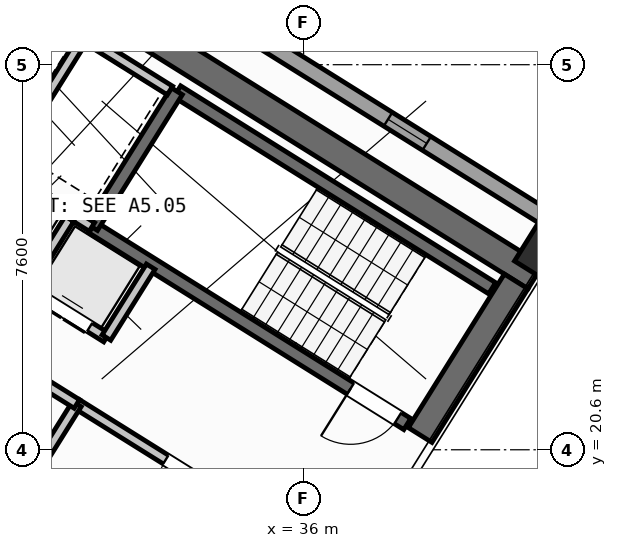
"""IFC4 building model, lengths in metres.
Left out: names, types, materials, properties, quantities, classifications, styles, units other than length and angle.
Written with IfcOpenShell. Run it as: python <this file> out.ifc"""

import sys

from ifc_helpers import new_model, si_unit, direction, frame, frame_2d, origin, origin_2d, place, context, subcontext, project, spatial, rectangle, hollow_rectangle, extrude, source, transform, mapped, element, fill, save


model = new_model("IFC4")
c1 = context("Model", 3, precision=1e-05, world=origin(), true_north=direction((0.0, 1.0)))
c2 = subcontext(c1, "Body", "Model", "MODEL_VIEW")
j1 = project(units=[si_unit("LENGTHUNIT", "METRE"), si_unit("PLANEANGLEUNIT", "RADIAN")], contexts=[c1])
p1 = place(None, origin())
s1 = spatial("IfcSite", under=j1, at=p1, CompositionType="ELEMENT")
p2 = place(p1, origin())
s2 = spatial("IfcBuilding", under=s1, at=p2, CompositionType="ELEMENT")
p3 = place(p2, frame((0.0, 0.0, 140.7)))
s3 = spatial("IfcBuildingStorey", under=s2, at=p3, CompositionType="ELEMENT", Elevation=140.7)
p4 = place(p3, frame((40.573, 24.01, 0.0), z_axis=(0.0, 0.0, 1.0), x_axis=(-0.848047359947, 0.529920442413, 0.0)))
e1 = element("IfcWall", 1, at=p4, inside=s3, PredefinedType="SHEAR", context=c2, shape_type="SweptSolid", body=[
    extrude(rectangle(XDim=13.14, YDim=0.55, at=frame_2d((6.57, 0.0))), origin(), (0.0, 0.0, 1.0), 3.35),
])
p5 = place(p3, frame((40.194, 23.922, 0.0), z_axis=(0.0, 0.0, 1.0), x_axis=(-0.529888438328, -0.848067357541, 0.0)))
e2 = element("IfcWall", 2, at=p5, inside=s3, PredefinedType="SHEAR", context=c2, shape_type="SweptSolid", body=[
    extrude(rectangle(XDim=3.575, YDim=0.55, at=frame_2d((1.788, 0.0))), origin(), (0.0, 0.0, 1.0), 3.35),
])
m1 = source(origin(), c2, "Body", "SweptSolid", [
    extrude(hollow_rectangle(XDim=0.9, YDim=0.9, WallThickness=0.036, at=origin_2d()), origin(), (0.0, 0.0, 1.0), 3.6),
])
p6 = place(p3, frame((40.783, 24.469, 0.0), z_axis=(0.0, 0.0, 1.0), x_axis=(-0.848048096156, 0.529919264233, 0.0)))
e3 = element("IfcColumn", 3, at=p6, inside=s3, PredefinedType="COLUMN", context=c2, shape_type="MappedRepresentation", body=[
    mapped(m1, transform((0.0, 0.0, 0.0), scale=1.0)),
])
p7 = place(p3, frame((14.138, 41.825, 0.0), z_axis=(0.0, 0.0, 1.0), x_axis=(0.848046498049, -0.529921821731, 0.0)))
e4 = element("IfcWall", 4, at=p7, inside=s3, PredefinedType="STANDARD", context=c2, shape_type="SweptSolid", body=[
    extrude(rectangle(XDim=31.588, YDim=0.32, at=frame_2d((15.794, 0.0))), origin(), (0.0, 0.0, 1.0), 3.35),
])
p8 = place(p7, frame((2.949, 0.0, 0.0)))
e5 = element("IfcOpeningElement", 5, at=p8, cuts=e4, PredefinedType="OPENING", context=c2, shape_type="SweptSolid", body=[
    extrude(rectangle(XDim=1.05, YDim=2.15, at=frame_2d((0.525, 1.075))), frame((0.0, 0.17, 0.0), z_axis=(0.0, -1.0, 0.0), x_axis=(1.0, 0.0, 0.0)), (0.0, 0.0, 1.0), 0.34),
])
p9 = place(p7, frame((0.861, 0.0, 0.85)))
e6 = element("IfcOpeningElement", 6, at=p9, cuts=e4, PredefinedType="OPENING", context=c2, shape_type="SweptSolid", body=[
    extrude(rectangle(XDim=1.5, YDim=1.5, at=frame_2d((0.75, 0.75))), frame((0.0, 0.17, 0.0), z_axis=(0.0, -1.0, 0.0), x_axis=(1.0, 0.0, 0.0)), (0.0, 0.0, 1.0), 0.34),
])
p10 = place(p7, frame((8.494, 0.0, 0.85)))
e7 = element("IfcOpeningElement", 7, at=p10, cuts=e4, PredefinedType="OPENING", context=c2, shape_type="SweptSolid", body=[
    extrude(rectangle(XDim=1.8, YDim=1.5, at=frame_2d((0.9, 0.75))), frame((0.0, 0.17, 0.0), z_axis=(0.0, -1.0, 0.0), x_axis=(1.0, 0.0, 0.0)), (0.0, 0.0, 1.0), 0.34),
])
p11 = place(p7, frame((13.874, 0.0, 0.85)))
e8 = element("IfcOpeningElement", 8, at=p11, cuts=e4, PredefinedType="OPENING", context=c2, shape_type="SweptSolid", body=[
    extrude(rectangle(XDim=1.5, YDim=1.5, at=frame_2d((0.75, 0.75))), frame((0.0, 0.17, 0.0), z_axis=(0.0, -1.0, 0.0), x_axis=(1.0, 0.0, 0.0)), (0.0, 0.0, 1.0), 0.34),
])
p12 = place(p7, frame((17.104, 0.0, 1.0)))
e9 = element("IfcOpeningElement", 9, at=p12, cuts=e4, PredefinedType="OPENING", context=c2, shape_type="SweptSolid", body=[
    extrude(rectangle(XDim=0.9, YDim=1.25, at=frame_2d((0.45, 0.625))), frame((0.0, 0.17, 0.0), z_axis=(0.0, -1.0, 0.0), x_axis=(1.0, 0.0, 0.0)), (0.0, 0.0, 1.0), 0.34),
])
p13 = place(p7, frame((22.144, 0.0, 1.0)))
e10 = element("IfcOpeningElement", 10, at=p13, cuts=e4, PredefinedType="OPENING", context=c2, shape_type="SweptSolid", body=[
    extrude(rectangle(XDim=0.9, YDim=1.25, at=frame_2d((0.45, 0.625))), frame((0.0, 0.17, 0.0), z_axis=(0.0, -1.0, 0.0), x_axis=(1.0, 0.0, 0.0)), (0.0, 0.0, 1.0), 0.34),
])
p14 = place(p7, frame((27.744, 0.0, 1.0)))
e11 = element("IfcOpeningElement", 11, at=p14, cuts=e4, PredefinedType="OPENING", context=c2, shape_type="SweptSolid", body=[
    extrude(rectangle(XDim=0.9, YDim=1.25, at=frame_2d((0.45, 0.625))), frame((0.0, 0.17, 0.0), z_axis=(0.0, -1.0, 0.0), x_axis=(1.0, 0.0, 0.0)), (0.0, 0.0, 1.0), 0.34),
])
p15 = place(p3, frame((31.28, 18.261, 0.0), z_axis=(0.0, 0.0, 1.0), x_axis=(-0.848051618787, 0.529913626805, 0.0)))
e12 = element("IfcWall", 12, at=p15, inside=s3, PredefinedType="SHEAR", context=c2, shape_type="SweptSolid", body=[
    extrude(rectangle(XDim=7.46, YDim=0.26, at=frame_2d((3.73, 0.0))), origin(), (0.0, 0.0, 1.0), 3.35),
])
p16 = place(p15, frame((0.36, 0.0, 0.0)))
e13 = element("IfcOpeningElement", 13, at=p16, cuts=e12, PredefinedType="OPENING", context=c2, shape_type="SweptSolid", body=[
    extrude(rectangle(XDim=0.86, YDim=2.05, at=frame_2d((0.43, 1.025))), frame((0.0, 0.14, 0.0), z_axis=(0.0, -1.0, 0.0), x_axis=(1.0, 0.0, 0.0)), (0.0, 0.0, 1.0), 0.28),
])
p17 = place(p3, frame((39.721, 23.788, 0.0), z_axis=(0.0, 0.0, 1.0), x_axis=(-0.848054434086, 0.529909121291, 0.0)))
e14 = element("IfcWall", 14, at=p17, inside=s3, PredefinedType="SHEAR", context=c2, shape_type="SweptSolid", body=[
    extrude(rectangle(XDim=7.33, YDim=0.26, at=frame_2d((3.665, 0.0))), origin(), (0.0, 0.0, 1.0), 3.35),
])
p18 = place(p3, frame((38.046, 21.108, 0.0), z_axis=(0.0, 0.0, 1.0), x_axis=(-0.848054434086, 0.529909121291, 0.0)))
e15 = element("IfcWall", 15, at=p18, inside=s3, PredefinedType="SHEAR", context=c2, shape_type="SweptSolid", body=[
    extrude(rectangle(XDim=7.33, YDim=0.26, at=frame_2d((3.665, 0.0))), origin(), (0.0, 0.0, 1.0), 3.35),
])
p19 = place(p18, frame((0.22, 0.0, 0.0)))
e16 = element("IfcOpeningElement", 16, at=p19, cuts=e15, PredefinedType="OPENING", context=c2, shape_type="SweptSolid", body=[
    extrude(rectangle(XDim=1.1, YDim=2.1, at=frame_2d((0.55, 1.05))), frame((0.0, 0.14, 0.0), z_axis=(0.0, -1.0, 0.0), x_axis=(1.0, 0.0, 0.0)), (0.0, 0.0, 1.0), 0.28),
])
p20 = place(p3, frame((33.496, 27.677, 0.0), z_axis=(0.0, 0.0, 1.0), x_axis=(-0.529908658664, -0.84805472316, 0.0)))
e17 = element("IfcWall", 17, at=p20, inside=s3, PredefinedType="SHEAR", context=c2, shape_type="SweptSolid", body=[
    extrude(rectangle(XDim=3.16, YDim=0.26, at=frame_2d((1.58, 0.0))), origin(), (0.0, 0.0, 1.0), 3.35),
])
p21 = place(p3, frame((36.417, 18.447, 0.0), z_axis=(0.0, 0.0, 1.0), x_axis=(-0.848064879198, 0.529892404805, 0.0)))
e18 = element("IfcWall", 18, at=p21, inside=s3, PredefinedType="STANDARD", context=c2, shape_type="SweptSolid", body=[
    extrude(rectangle(XDim=5.768, YDim=0.2, at=frame_2d((2.884, 0.0))), origin(), (0.0, 0.0, 1.0), 3.34),
])
p22 = place(p21, frame((2.548, 0.0, 0.0)))
e19 = element("IfcOpeningElement", 19, at=p22, cuts=e18, PredefinedType="OPENING", context=c2, shape_type="SweptSolid", body=[
    extrude(rectangle(XDim=1.15, YDim=2.1, at=frame_2d((0.575, 1.05))), frame((0.0, 0.11, 0.0), z_axis=(0.0, -1.0, 0.0), x_axis=(1.0, 0.0, 0.0)), (0.0, 0.0, 1.0), 0.22),
])
p23 = place(p3, frame((31.822, 24.998, 0.0), z_axis=(0.0, 0.0, 1.0), x_axis=(-0.848036912365, 0.52993716162, 0.0)))
e20 = element("IfcWall", 20, at=p23, inside=s3, PredefinedType="STANDARD", context=c2, shape_type="SweptSolid", body=[
    extrude(rectangle(XDim=4.618, YDim=0.2, at=frame_2d((2.309, 0.0))), origin(), (0.0, 0.0, 1.0), 3.34),
])
p24 = place(p3, frame((32.108, 22.814, 0.0), z_axis=(0.0, 0.0, 1.0), x_axis=(-0.848042229521, 0.529928652696, 0.0)))
e21 = element("IfcWall", 21, at=p24, inside=s3, PredefinedType="STANDARD", context=c2, shape_type="SweptSolid", body=[
    extrude(rectangle(XDim=5.62, YDim=0.2, at=frame_2d((2.81, 0.0))), origin(), (0.0, 0.0, 1.0), 3.34),
])
p25 = place(p24, frame((0.39, 0.0, 0.0)))
e22 = element("IfcOpeningElement", 22, at=p25, cuts=e21, PredefinedType="OPENING", context=c2, shape_type="SweptSolid", body=[
    extrude(rectangle(XDim=1.1, YDim=2.15, at=frame_2d((0.55, 1.075))), frame((0.0, 0.11, 0.0), z_axis=(0.0, -1.0, 0.0), x_axis=(1.0, 0.0, 0.0)), (0.0, 0.0, 1.0), 0.22),
])
p26 = place(p24, frame((2.25, 0.0, 0.0)))
e23 = element("IfcOpeningElement", 23, at=p26, cuts=e21, PredefinedType="OPENING", context=c2, shape_type="SweptSolid", body=[
    extrude(rectangle(XDim=1.1, YDim=2.15, at=frame_2d((0.55, 1.075))), frame((0.0, 0.11, 0.0), z_axis=(0.0, -1.0, 0.0), x_axis=(1.0, 0.0, 0.0)), (0.0, 0.0, 1.0), 0.22),
])
p27 = place(p24, frame((4.11, 0.0, 0.0)))
e24 = element("IfcOpeningElement", 24, at=p27, cuts=e21, PredefinedType="OPENING", context=c2, shape_type="SweptSolid", body=[
    extrude(rectangle(XDim=1.1, YDim=2.15, at=frame_2d((0.55, 1.075))), frame((0.0, 0.11, 0.0), z_axis=(0.0, -1.0, 0.0), x_axis=(1.0, 0.0, 0.0)), (0.0, 0.0, 1.0), 0.22),
])
p28 = place(p3, frame((32.982, 24.213, 0.0), z_axis=(0.0, 0.0, 1.0), x_axis=(-0.529839334948, -0.84809803628, 0.0)))
e25 = element("IfcWall", 25, at=p28, inside=s3, PredefinedType="STANDARD", context=c2, shape_type="SweptSolid", body=[
    extrude(rectangle(XDim=1.65, YDim=0.2, at=frame_2d((0.825, 0.0))), origin(), (0.0, 0.0, 1.0), 3.34),
])
p29 = place(p3, frame((31.645, 28.716, 0.0), z_axis=(0.0, 0.0, 1.0), x_axis=(-0.52986693015, -0.848080795876, 0.0)))
e26 = element("IfcWall", 26, at=p29, inside=s3, PredefinedType="STANDARD", context=c2, shape_type="SweptSolid", body=[
    extrude(rectangle(XDim=2.66, YDim=0.2, at=frame_2d((1.33, 0.0))), origin(), (0.0, 0.0, 1.0), 3.34),
])
p30 = place(p3, frame((33.363, 27.69, 0.0), z_axis=(0.0, 0.0, 1.0), x_axis=(-0.848047090064, 0.529920874315, 0.0)))
e27 = element("IfcWall", 27, at=p30, inside=s3, PredefinedType="STANDARD", context=c2, shape_type="SweptSolid", body=[
    extrude(rectangle(XDim=4.498, YDim=0.2, at=frame_2d((2.249, 0.0))), origin(), (0.0, 0.0, 1.0), 3.34),
])
p31 = place(p3, frame((31.379, 25.156, 0.0), z_axis=(0.0, 0.0, 1.0), x_axis=(-0.529998940003, -0.847998304005, 0.0)))
e28 = element("IfcWall", 28, at=p31, inside=s3, PredefinedType="STANDARD", context=c2, shape_type="SweptSolid", body=[
    extrude(rectangle(XDim=1.58, YDim=0.2, at=frame_2d((0.79, 0.0))), origin(), (0.0, 0.0, 1.0), 3.34),
])
p32 = place(p3, frame((31.525, 21.504, 0.0), z_axis=(0.0, 0.0, 1.0), x_axis=(-0.529907497854, -0.848055448493, 0.0)))
e29 = element("IfcWall", 29, at=p32, inside=s3, PredefinedType="STANDARD", context=c2, shape_type="SweptSolid", body=[
    extrude(rectangle(XDim=2.88, YDim=0.2, at=frame_2d((1.44, 0.0))), origin(), (0.0, 0.0, 1.0), 3.34),
])
p33 = place(p3, frame((31.525, 21.504, 0.0), z_axis=(0.0, 0.0, 1.0), x_axis=(-0.848040211232, 0.529931882541, 0.0)))
e30 = element("IfcWall", 30, at=p33, inside=s3, PredefinedType="STANDARD", context=c2, shape_type="SweptSolid", body=[
    extrude(rectangle(XDim=6.218, YDim=0.2, at=frame_2d((3.109, 0.0))), origin(), (0.0, 0.0, 1.0), 3.34),
])
p34 = place(p33, frame((4.4, 0.0, 0.0)))
e31 = element("IfcOpeningElement", 31, at=p34, cuts=e30, PredefinedType="OPENING", context=c2, shape_type="SweptSolid", body=[
    extrude(rectangle(XDim=0.86, YDim=2.05, at=frame_2d((0.43, 1.025))), frame((0.0, 0.11, 0.0), z_axis=(0.0, -1.0, 0.0), x_axis=(1.0, 0.0, 0.0)), (0.0, 0.0, 1.0), 0.22),
])
p35 = place(p33, frame((1.45, 0.0, 0.0)))
e32 = element("IfcOpeningElement", 32, at=p35, cuts=e30, PredefinedType="OPENING", context=c2, shape_type="SweptSolid", body=[
    extrude(rectangle(XDim=0.86, YDim=2.05, at=frame_2d((0.43, 1.025))), frame((0.0, 0.11, 0.0), z_axis=(0.0, -1.0, 0.0), x_axis=(1.0, 0.0, 0.0)), (0.0, 0.0, 1.0), 0.22),
])
m2 = source(origin(), c2, "Body", "SweptSolid", [
    extrude(rectangle(XDim=0.9, YDim=1.25, at=frame_2d((0.45, 0.625))), frame((0.0, 0.03, 0.0), z_axis=(0.0, -1.0, 0.0), x_axis=(1.0, 0.0, 0.0)), (0.0, 0.0, 1.0), 0.06),
])
p36 = place(p14, origin())
e33 = element("IfcWindow", 33, at=p36, inside=s3, PartitioningType="SINGLE_PANEL", PredefinedType="WINDOW", context=c2, shape_type="MappedRepresentation", body=[
    mapped(m2, transform((0.0, 0.0, 0.0), scale=1.0)),
])
fill(e11, e33)
m3 = source(origin(), c2, "Body", "SweptSolid", [
    extrude(rectangle(XDim=1.1, YDim=2.1, at=frame_2d((0.55, 1.05))), frame((0.0, 0.025, 0.0), z_axis=(0.0, -1.0, 0.0), x_axis=(1.0, 0.0, 0.0)), (0.0, 0.0, 1.0), 0.05),
])
p37 = place(p19, origin())
e34 = element("IfcDoor", 34, at=p37, inside=s3, OperationType="SINGLE_SWING_RIGHT", PredefinedType="DOOR", context=c2, shape_type="MappedRepresentation", body=[
    mapped(m3, transform((0.0, 0.0, 0.0), scale=1.0)),
])
fill(e16, e34)
m4 = source(origin(), c2, "Body", "SweptSolid", [
    extrude(rectangle(XDim=1.15, YDim=2.1, at=frame_2d((0.575, 1.05))), frame((0.0, 0.025, 0.0), z_axis=(0.0, -1.0, 0.0), x_axis=(1.0, 0.0, 0.0)), (0.0, 0.0, 1.0), 0.05),
])
p38 = place(p22, origin())
e35 = element("IfcDoor", 35, at=p38, inside=s3, OperationType="SINGLE_SWING_LEFT", PredefinedType="DOOR", context=c2, shape_type="MappedRepresentation", body=[
    mapped(m4, transform((0.0, 0.0, 0.0), scale=1.0)),
])
fill(e19, e35)
m5 = source(origin(), c2, "Body", "SweptSolid", [
    extrude(rectangle(XDim=1.1, YDim=2.15, at=frame_2d((0.55, 1.075))), frame((0.0, 0.025, 0.0), z_axis=(0.0, -1.0, 0.0), x_axis=(1.0, 0.0, 0.0)), (0.0, 0.0, 1.0), 0.05),
])
p39 = place(p25, origin())
e36 = element("IfcDoor", 36, at=p39, inside=s3, OperationType="DOUBLE_DOOR_SLIDING", PredefinedType="DOOR", context=c2, shape_type="MappedRepresentation", body=[
    mapped(m5, transform((0.0, 0.0, 0.0), scale=1.0)),
])
fill(e22, e36)
save(model, sys.argv[1])
